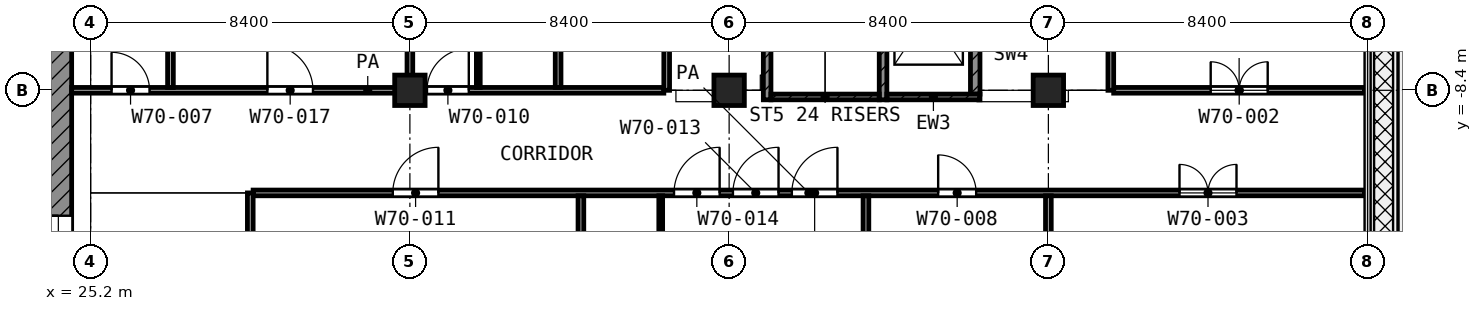
"""IFC4 building model, lengths in metres.
Left out: names, types, materials, properties, quantities, classifications, styles, units other than length and angle.
Written with IfcOpenShell. Run it as: python <this file> out.ifc"""

import sys

from ifc_helpers import new_model, si_unit, direction, frame, frame_2d, origin, origin_2d, place, context, subcontext, project, spatial, rectangle, extrude, element, fill, save


model = new_model("IFC4")
c1 = context("Model", 3, precision=1e-05, world=origin(), true_north=direction((0.0, 1.0)))
c2 = subcontext(c1, "Body", "Model", "MODEL_VIEW")
j1 = project(units=[si_unit("LENGTHUNIT", "METRE"), si_unit("PLANEANGLEUNIT", "RADIAN")], contexts=[c1])
p1 = place(None, origin())
s1 = spatial("IfcSite", under=j1, at=p1, CompositionType="ELEMENT")
p2 = place(p1, origin())
s2 = spatial("IfcBuilding", under=s1, at=p2, CompositionType="ELEMENT")
p3 = place(p2, frame((0.0, 0.0, 302.8)))
s3 = spatial("IfcBuildingStorey", under=s2, at=p3, CompositionType="ELEMENT", Elevation=302.8)
for number, where, z_axis, x_axis in (
    (1, (33.6, -8.4, 0.0), (0.0, 0.0, 1.0), (1.0, 0.0, 0.0)),
    (2, (42.0, -8.4, 0.0), (0.0, 0.0, 1.0), (1.0, 0.0, 0.0)),
    (3, (50.4, -8.4, 0.0), (0.0, 0.0, 1.0), (1.0, 0.0, 0.0)),
):
    element("IfcColumn", number, at=place(p3, frame(where, z_axis=z_axis, x_axis=x_axis)), inside=s3, PredefinedType="COLUMN", context=c2, shape_type="SweptSolid", body=[
        extrude(rectangle(XDim=0.8, YDim=0.8, at=origin_2d()), origin(), (0.0, 0.0, 1.0), 4.2),
    ])
p4 = place(p3, frame((24.35, -24.0, 0.0), z_axis=(0.0, 0.0, 1.0), x_axis=(0.0, 1.0, 0.0)))
e4 = element("IfcWall", 4, at=p4, inside=s3, PredefinedType="SHEAR", context=c2, shape_type="SweptSolid", body=[
    extrude(rectangle(XDim=18.6, YDim=0.7, at=frame_2d((9.3, 0.0))), origin(), (0.0, 0.0, 1.0), 3.6),
])
p5 = place(p4, frame((10.5, 0.0, 0.0)))
e5 = element("IfcOpeningElement", 5, at=p5, cuts=e4, PredefinedType="OPENING", context=c2, shape_type="SweptSolid", body=[
    extrude(rectangle(XDim=1.8, YDim=2.1, at=frame_2d((0.9, 1.05))), frame((0.0, 0.36, 0.0), z_axis=(0.0, -1.0, 0.0), x_axis=(1.0, 0.0, 0.0)), (0.0, 0.0, 1.0), 0.72),
])
p6 = place(p3, frame((43.0, -8.65, 0.0), z_axis=(0.0, 0.0, 1.0), x_axis=(0.0, 1.0, 0.0)))
e6 = element("IfcWall", 6, at=p6, inside=s3, PredefinedType="SHEAR", context=c2, shape_type="SweptSolid", body=[
    extrude(rectangle(XDim=8.35, YDim=0.2, at=frame_2d((4.175, 0.0))), origin(), (0.0, 0.0, 1.0), 3.6),
])
p7 = place(p6, frame((7.0, 0.0, 0.0)))
e7 = element("IfcOpeningElement", 7, at=p7, cuts=e6, PredefinedType="OPENING", context=c2, shape_type="SweptSolid", body=[
    extrude(rectangle(XDim=1.1, YDim=2.1, at=frame_2d((0.55, 1.05))), frame((0.0, 0.11, 0.0), z_axis=(0.0, -1.0, 0.0), x_axis=(1.0, 0.0, 0.0)), (0.0, 0.0, 1.0), 0.22),
])
p8 = place(p3, frame((46.05, -8.65, 0.0), z_axis=(0.0, 0.0, 1.0), x_axis=(0.0, 1.0, 0.0)))
e8 = element("IfcWall", 8, at=p8, inside=s3, PredefinedType="SHEAR", context=c2, shape_type="SweptSolid", body=[
    extrude(rectangle(XDim=8.35, YDim=0.2, at=frame_2d((4.175, 0.0))), origin(), (0.0, 0.0, 1.0), 3.6),
])
p9 = place(p8, frame((7.0, 0.0, 0.0)))
e9 = element("IfcOpeningElement", 9, at=p9, cuts=e8, PredefinedType="OPENING", context=c2, shape_type="SweptSolid", body=[
    extrude(rectangle(XDim=1.1, YDim=2.1, at=frame_2d((0.55, 1.05))), frame((0.0, 0.11, 0.0), z_axis=(0.0, -1.0, 0.0), x_axis=(1.0, 0.0, 0.0)), (0.0, 0.0, 1.0), 0.22),
])
p10 = place(p3, frame((43.1, -8.575, 0.0), z_axis=(0.0, 0.0, 1.0), x_axis=(1.0, 0.0, 0.0)))
e10 = element("IfcWall", 10, at=p10, inside=s3, PredefinedType="SHEAR", context=c2, shape_type="SweptSolid", body=[
    extrude(rectangle(XDim=2.85, YDim=0.15, at=frame_2d((1.425, 0.0))), origin(), (0.0, 0.0, 1.0), 3.6),
])
p11 = place(p3, frame((46.15, -8.575, 0.0), z_axis=(0.0, 0.0, 1.0), x_axis=(1.0, 0.0, 0.0)))
e11 = element("IfcWall", 11, at=p11, inside=s3, PredefinedType="SHEAR", context=c2, shape_type="SweptSolid", body=[
    extrude(rectangle(XDim=2.45, YDim=0.15, at=frame_2d((1.225, 0.0))), origin(), (0.0, 0.0, 1.0), 3.6),
])
p12 = place(p3, frame((48.475, -8.5, 0.0), z_axis=(0.0, 0.0, 1.0), x_axis=(0.0, 1.0, 0.0)))
e12 = element("IfcWall", 12, at=p12, inside=s3, PredefinedType="SHEAR", context=c2, shape_type="SweptSolid", body=[
    extrude(rectangle(XDim=3.475, YDim=0.25, at=frame_2d((1.738, 0.0))), origin(), (0.0, 0.0, 1.0), 3.6),
])
for number, where, z_axis, x_axis in (
    (13, (35.4, -8.325, 0.0), (0.0, 0.0, 1.0), (0.0, 1.0, 0.0)),
    (14, (40.2, -14.4, 0.0), (0.0, 0.0, 1.0), (0.0, 1.0, 0.0)),
):
    element("IfcWall", number, at=place(p3, frame(where, z_axis=z_axis, x_axis=x_axis)), inside=s3, PredefinedType="PARTITIONING", context=c2, shape_type="SweptSolid", body=[
        extrude(rectangle(XDim=3.225, YDim=0.1, at=frame_2d((1.612, 0.0))), origin(), (0.0, 0.0, 1.0), 3.6),
    ])
p13 = place(p3, frame((29.475, -11.1, 0.0), z_axis=(0.0, 0.0, 1.0), x_axis=(1.0, 0.0, 0.0)))
e15 = element("IfcWall", 15, at=p13, inside=s3, PredefinedType="PARTITIONING", context=c2, shape_type="SweptSolid", body=[
    extrude(rectangle(XDim=29.245, YDim=0.15, at=frame_2d((14.623, 0.0))), origin(), (0.0, 0.0, 1.0), 3.6),
])
p14 = place(p13, frame((3.675, 0.0, 0.0)))
e16 = element("IfcOpeningElement", 16, at=p14, cuts=e15, PredefinedType="OPENING", context=c2, shape_type="SweptSolid", body=[
    extrude(rectangle(XDim=1.2, YDim=2.1, at=frame_2d((0.6, 1.05))), frame((0.0, 0.085, 0.0), z_axis=(0.0, -1.0, 0.0), x_axis=(1.0, 0.0, 0.0)), (0.0, 0.0, 1.0), 0.17),
])
p15 = place(p13, frame((14.175, 0.0, 0.0)))
e17 = element("IfcOpeningElement", 17, at=p15, cuts=e15, PredefinedType="OPENING", context=c2, shape_type="SweptSolid", body=[
    extrude(rectangle(XDim=1.2, YDim=2.1, at=frame_2d((0.6, 1.05))), frame((0.0, 0.085, 0.0), z_axis=(0.0, -1.0, 0.0), x_axis=(1.0, 0.0, 0.0)), (0.0, 0.0, 1.0), 0.17),
])
p16 = place(p13, frame((12.625, 0.0, 0.0)))
e18 = element("IfcOpeningElement", 18, at=p16, cuts=e15, PredefinedType="OPENING", context=c2, shape_type="SweptSolid", body=[
    extrude(rectangle(XDim=1.2, YDim=2.1, at=frame_2d((0.6, 1.05))), frame((0.0, 0.085, 0.0), z_axis=(0.0, -1.0, 0.0), x_axis=(1.0, 0.0, 0.0)), (0.0, 0.0, 1.0), 0.17),
])
p17 = place(p13, frame((11.075, 0.0, 0.0)))
e19 = element("IfcOpeningElement", 19, at=p17, cuts=e15, PredefinedType="OPENING", context=c2, shape_type="SweptSolid", body=[
    extrude(rectangle(XDim=1.2, YDim=2.1, at=frame_2d((0.6, 1.05))), frame((0.0, 0.085, 0.0), z_axis=(0.0, -1.0, 0.0), x_axis=(1.0, 0.0, 0.0)), (0.0, 0.0, 1.0), 0.17),
])
p18 = place(p13, frame((18.025, 0.0, 0.0)))
e20 = element("IfcOpeningElement", 20, at=p18, cuts=e15, PredefinedType="OPENING", context=c2, shape_type="SweptSolid", body=[
    extrude(rectangle(XDim=1.0, YDim=2.1, at=frame_2d((0.5, 1.05))), frame((0.0, 0.085, 0.0), z_axis=(0.0, -1.0, 0.0), x_axis=(1.0, 0.0, 0.0)), (0.0, 0.0, 1.0), 0.17),
])
p19 = place(p13, frame((24.375, 0.0, 0.0)))
e21 = element("IfcOpeningElement", 21, at=p19, cuts=e15, PredefinedType="OPENING", context=c2, shape_type="SweptSolid", body=[
    extrude(rectangle(XDim=1.5, YDim=2.1, at=frame_2d((0.75, 1.05))), frame((0.0, 0.085, 0.0), z_axis=(0.0, -1.0, 0.0), x_axis=(1.0, 0.0, 0.0)), (0.0, 0.0, 1.0), 0.17),
])
p20 = place(p3, frame((24.7, -8.4, 0.0), z_axis=(0.0, 0.0, 1.0), x_axis=(1.0, 0.0, 0.0)))
e22 = element("IfcWall", 22, at=p20, inside=s3, PredefinedType="PARTITIONING", context=c2, shape_type="SweptSolid", body=[
    extrude(rectangle(XDim=15.582, YDim=0.15, at=frame_2d((7.791, 0.0))), origin(), (0.0, 0.0, 1.0), 3.6),
])
p21 = place(p20, frame((9.35, 0.0, 0.0)))
e23 = element("IfcOpeningElement", 23, at=p21, cuts=e22, PredefinedType="OPENING", context=c2, shape_type="SweptSolid", body=[
    extrude(rectangle(XDim=1.1, YDim=2.1, at=frame_2d((0.55, 1.05))), frame((0.0, 0.085, 0.0), z_axis=(0.0, -1.0, 0.0), x_axis=(1.0, 0.0, 0.0)), (0.0, 0.0, 1.0), 0.17),
])
p22 = place(p20, frame((1.05, 0.0, 0.0)))
e24 = element("IfcOpeningElement", 24, at=p22, cuts=e22, PredefinedType="OPENING", context=c2, shape_type="SweptSolid", body=[
    extrude(rectangle(XDim=1.0, YDim=2.1, at=frame_2d((0.5, 1.05))), frame((0.0, 0.085, 0.0), z_axis=(0.0, -1.0, 0.0), x_axis=(1.0, 0.0, 0.0)), (0.0, 0.0, 1.0), 0.17),
])
p23 = place(p20, frame((5.15, 0.0, 0.0)))
e25 = element("IfcOpeningElement", 25, at=p23, cuts=e22, PredefinedType="OPENING", context=c2, shape_type="SweptSolid", body=[
    extrude(rectangle(XDim=1.2, YDim=2.1, at=frame_2d((0.6, 1.05))), frame((0.0, 0.085, 0.0), z_axis=(0.0, -1.0, 0.0), x_axis=(1.0, 0.0, 0.0)), (0.0, 0.0, 1.0), 0.17),
])
p24 = place(p3, frame((52.118, -8.4, 0.0), z_axis=(0.0, 0.0, 1.0), x_axis=(1.0, 0.0, 0.0)))
e26 = element("IfcWall", 26, at=p24, inside=s3, PredefinedType="PARTITIONING", context=c2, shape_type="SweptSolid", body=[
    extrude(rectangle(XDim=6.602, YDim=0.15, at=frame_2d((3.301, 0.0))), origin(), (0.0, 0.0, 1.0), 3.6),
])
p25 = place(p24, frame((2.553, 0.0, 0.0)))
e27 = element("IfcOpeningElement", 27, at=p25, cuts=e26, PredefinedType="OPENING", context=c2, shape_type="SweptSolid", body=[
    extrude(rectangle(XDim=1.5, YDim=2.1, at=frame_2d((0.75, 1.05))), frame((0.0, 0.085, 0.0), z_axis=(0.0, -1.0, 0.0), x_axis=(1.0, 0.0, 0.0)), (0.0, 0.0, 1.0), 0.17),
])
p26 = place(p3, frame((27.3, -8.325, 0.0), z_axis=(0.0, 0.0, 1.0), x_axis=(0.0, 1.0, 0.0)))
e28 = element("IfcWall", 28, at=p26, inside=s3, PredefinedType="PARTITIONING", context=c2, shape_type="SweptSolid", body=[
    extrude(rectangle(XDim=8.245, YDim=0.15, at=frame_2d((4.123, 0.0))), origin(), (0.0, 0.0, 1.0), 3.6),
])
p27 = place(p3, frame((29.4, -31.198, 0.0), z_axis=(0.0, 0.0, 1.0), x_axis=(0.0, 1.0, 0.0)))
e29 = element("IfcWall", 29, at=p27, inside=s3, PredefinedType="PARTITIONING", context=c2, shape_type="SweptSolid", body=[
    extrude(rectangle(XDim=20.098, YDim=0.15, at=frame_2d((10.049, 0.0))), origin(), (0.0, 0.0, 1.0), 3.6),
])
for number, where, z_axis, x_axis in (
    (30, (33.6, -8.325, 0.0), (0.0, 0.0, 1.0), (0.0, 1.0, 0.0)),
    (31, (37.5, -8.325, 0.0), (0.0, 0.0, 1.0), (0.0, 1.0, 0.0)),
):
    element("IfcWall", number, at=place(p3, frame(where, z_axis=z_axis, x_axis=x_axis)), inside=s3, PredefinedType="PARTITIONING", context=c2, shape_type="SweptSolid", body=[
        extrude(rectangle(XDim=8.245, YDim=0.15, at=frame_2d((4.123, 0.0))), origin(), (0.0, 0.0, 1.0), 3.6),
    ])
p28 = place(p3, frame((38.1, -25.12, 0.0), z_axis=(0.0, 0.0, 1.0), x_axis=(0.0, 1.0, 0.0)))
e32 = element("IfcWall", 32, at=p28, inside=s3, PredefinedType="PARTITIONING", context=c2, shape_type="SweptSolid", body=[
    extrude(rectangle(XDim=13.945, YDim=0.15, at=frame_2d((6.973, 0.0))), origin(), (0.0, 0.0, 1.0), 3.6),
])
p29 = place(p3, frame((40.357, -8.4, 0.0), z_axis=(0.0, 0.0, 1.0), x_axis=(0.0, 1.0, 0.0)))
e33 = element("IfcWall", 33, at=p29, inside=s3, PredefinedType="PARTITIONING", context=c2, shape_type="SweptSolid", body=[
    extrude(rectangle(XDim=8.048, YDim=0.15, at=frame_2d((4.024, 0.0))), origin(), (0.0, 0.0, 1.0), 3.6),
])
p30 = place(p29, frame((3.574, 0.0, 0.0)))
e34 = element("IfcOpeningElement", 34, at=p30, cuts=e33, PredefinedType="OPENING", context=c2, shape_type="SweptSolid", body=[
    extrude(rectangle(XDim=0.9, YDim=2.1, at=frame_2d((0.45, 1.05))), frame((0.0, 0.085, 0.0), z_axis=(0.0, -1.0, 0.0), x_axis=(1.0, 0.0, 0.0)), (0.0, 0.0, 1.0), 0.17),
])
for number, where, z_axis, x_axis in (
    (35, (45.6, -25.12, 0.0), (0.0, 0.0, 1.0), (0.0, 1.0, 0.0)),
    (36, (50.4, -25.12, 0.0), (0.0, 0.0, 1.0), (0.0, 1.0, 0.0)),
):
    element("IfcWall", number, at=place(p3, frame(where, z_axis=z_axis, x_axis=x_axis)), inside=s3, PredefinedType="PARTITIONING", context=c2, shape_type="SweptSolid", body=[
        extrude(rectangle(XDim=13.945, YDim=0.15, at=frame_2d((6.973, 0.0))), origin(), (0.0, 0.0, 1.0), 3.6),
    ])
p31 = place(p3, frame((52.043, -8.4, 0.0), z_axis=(0.0, 0.0, 1.0), x_axis=(0.0, 1.0, 0.0)))
e37 = element("IfcWall", 37, at=p31, inside=s3, PredefinedType="PARTITIONING", context=c2, shape_type="SweptSolid", body=[
    extrude(rectangle(XDim=6.548, YDim=0.15, at=frame_2d((3.274, 0.0))), origin(), (0.0, 0.0, 1.0), 3.6),
])
p32 = place(p5, origin())
e38 = element("IfcDoor", 38, at=p32, inside=s3, OperationType="DOUBLE_DOOR_SINGLE_SWING", PredefinedType="DOOR", context=c2, shape_type="SweptSolid", body=[
    extrude(rectangle(XDim=1.8, YDim=2.1, at=frame_2d((0.9, 1.05))), frame((0.0, 0.025, 0.0), z_axis=(0.0, -1.0, 0.0), x_axis=(1.0, 0.0, 0.0)), (0.0, 0.0, 1.0), 0.05),
])
fill(e5, e38)
p33 = place(p21, origin())
e39 = element("IfcDoor", 39, at=p33, inside=s3, OperationType="SINGLE_SWING_RIGHT", PredefinedType="DOOR", context=c2, shape_type="SweptSolid", body=[
    extrude(rectangle(XDim=1.1, YDim=2.1, at=frame_2d((0.55, 1.05))), frame((0.0, 0.025, 0.0), z_axis=(0.0, -1.0, 0.0), x_axis=(1.0, 0.0, 0.0)), (0.0, 0.0, 1.0), 0.05),
])
fill(e23, e39)
p34 = place(p25, origin())
e40 = element("IfcDoor", 40, at=p34, inside=s3, OperationType="DOUBLE_DOOR_SINGLE_SWING", PredefinedType="DOOR", context=c2, shape_type="SweptSolid", body=[
    extrude(rectangle(XDim=1.5, YDim=2.1, at=frame_2d((0.75, 1.05))), frame((0.0, 0.025, 0.0), z_axis=(0.0, -1.0, 0.0), x_axis=(1.0, 0.0, 0.0)), (0.0, 0.0, 1.0), 0.05),
])
fill(e27, e40)
p35 = place(p14, origin())
e41 = element("IfcDoor", 41, at=p35, inside=s3, OperationType="SINGLE_SWING_RIGHT", PredefinedType="DOOR", context=c2, shape_type="SweptSolid", body=[
    extrude(rectangle(XDim=1.2, YDim=2.1, at=frame_2d((0.6, 1.05))), frame((0.0, 0.025, 0.0), z_axis=(0.0, -1.0, 0.0), x_axis=(1.0, 0.0, 0.0)), (0.0, 0.0, 1.0), 0.05),
])
fill(e16, e41)
p36 = place(p15, origin())
e42 = element("IfcDoor", 42, at=p36, inside=s3, OperationType="SINGLE_SWING_RIGHT", PredefinedType="DOOR", context=c2, shape_type="SweptSolid", body=[
    extrude(rectangle(XDim=1.2, YDim=2.1, at=frame_2d((0.6, 1.05))), frame((0.0, 0.025, 0.0), z_axis=(0.0, -1.0, 0.0), x_axis=(1.0, 0.0, 0.0)), (0.0, 0.0, 1.0), 0.05),
])
fill(e17, e42)
p37 = place(p16, origin())
e43 = element("IfcDoor", 43, at=p37, inside=s3, OperationType="SINGLE_SWING_RIGHT", PredefinedType="DOOR", context=c2, shape_type="SweptSolid", body=[
    extrude(rectangle(XDim=1.2, YDim=2.1, at=frame_2d((0.6, 1.05))), frame((0.0, 0.025, 0.0), z_axis=(0.0, -1.0, 0.0), x_axis=(1.0, 0.0, 0.0)), (0.0, 0.0, 1.0), 0.05),
])
fill(e18, e43)
p38 = place(p17, origin())
e44 = element("IfcDoor", 44, at=p38, inside=s3, OperationType="SINGLE_SWING_RIGHT", PredefinedType="DOOR", context=c2, shape_type="SweptSolid", body=[
    extrude(rectangle(XDim=1.2, YDim=2.1, at=frame_2d((0.6, 1.05))), frame((0.0, 0.025, 0.0), z_axis=(0.0, -1.0, 0.0), x_axis=(1.0, 0.0, 0.0)), (0.0, 0.0, 1.0), 0.05),
])
fill(e19, e44)
p39 = place(p18, origin())
e45 = element("IfcDoor", 45, at=p39, inside=s3, OperationType="SINGLE_SWING_LEFT", PredefinedType="DOOR", context=c2, shape_type="SweptSolid", body=[
    extrude(rectangle(XDim=1.0, YDim=2.1, at=frame_2d((0.5, 1.05))), frame((0.0, 0.025, 0.0), z_axis=(0.0, -1.0, 0.0), x_axis=(1.0, 0.0, 0.0)), (0.0, 0.0, 1.0), 0.05),
])
fill(e20, e45)
p40 = place(p19, origin())
e46 = element("IfcDoor", 46, at=p40, inside=s3, OperationType="DOUBLE_DOOR_SINGLE_SWING", PredefinedType="DOOR", context=c2, shape_type="SweptSolid", body=[
    extrude(rectangle(XDim=1.5, YDim=2.1, at=frame_2d((0.75, 1.05))), frame((0.0, 0.025, 0.0), z_axis=(0.0, -1.0, 0.0), x_axis=(1.0, 0.0, 0.0)), (0.0, 0.0, 1.0), 0.05),
])
fill(e21, e46)
p41 = place(p22, origin())
e47 = element("IfcDoor", 47, at=p41, inside=s3, OperationType="SINGLE_SWING_LEFT", PredefinedType="DOOR", context=c2, shape_type="SweptSolid", body=[
    extrude(rectangle(XDim=1.0, YDim=2.1, at=frame_2d((0.5, 1.05))), frame((0.0, 0.025, 0.0), z_axis=(0.0, -1.0, 0.0), x_axis=(1.0, 0.0, 0.0)), (0.0, 0.0, 1.0), 0.05),
])
fill(e24, e47)
p42 = place(p23, origin())
e48 = element("IfcDoor", 48, at=p42, inside=s3, OperationType="SINGLE_SWING_LEFT", PredefinedType="DOOR", context=c2, shape_type="SweptSolid", body=[
    extrude(rectangle(XDim=1.2, YDim=2.1, at=frame_2d((0.6, 1.05))), frame((0.0, 0.025, 0.0), z_axis=(0.0, -1.0, 0.0), x_axis=(1.0, 0.0, 0.0)), (0.0, 0.0, 1.0), 0.05),
])
fill(e25, e48)
save(model, sys.argv[1])
